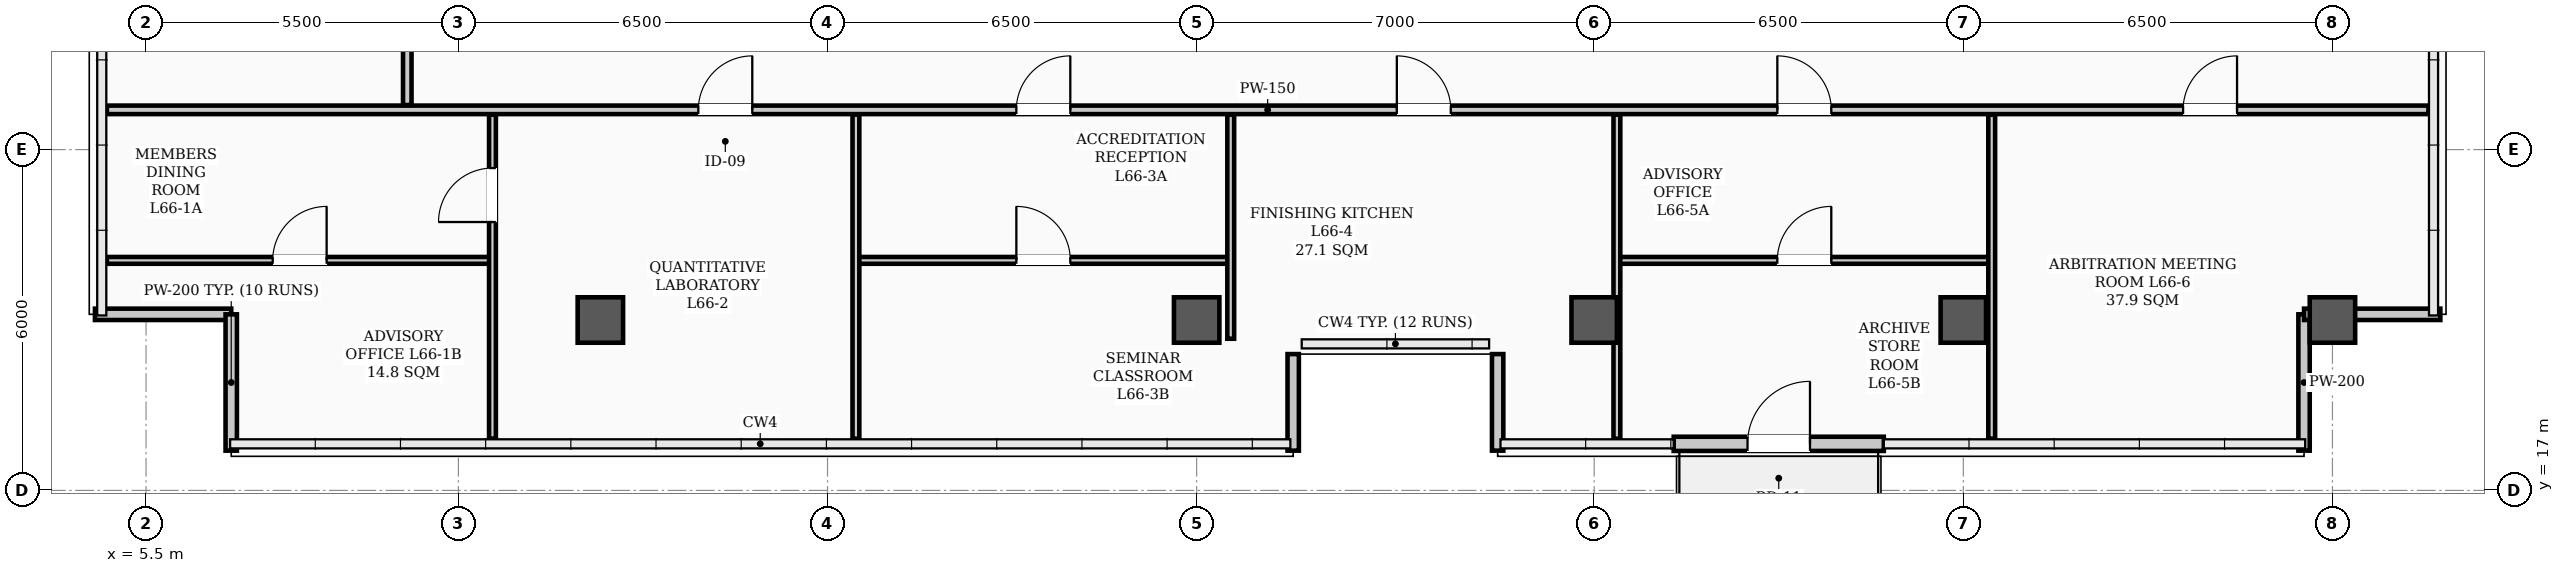
"""IFC4 building model, lengths in metres.
Left out: names, types, materials, properties, quantities, classifications, styles, units other than length and angle.
Written with IfcOpenShell. Run it as: python <this file> out.ifc"""

import sys

from ifc_helpers import new_model, si_unit, direction, frame, frame_2d, origin, origin_2d, place, context, subcontext, project, spatial, rectangle, hollow_rectangle, extrude, element, fill, save


model = new_model("IFC4")
c1 = context("Model", 3, precision=1e-05, world=origin(), true_north=direction((0.0, 1.0)))
c2 = subcontext(c1, "Body", "Model", "MODEL_VIEW")
j1 = project(units=[si_unit("LENGTHUNIT", "METRE"), si_unit("PLANEANGLEUNIT", "RADIAN")], contexts=[c1])
p1 = place(None, origin())
s1 = spatial("IfcSite", under=j1, at=p1, CompositionType="ELEMENT")
p2 = place(p1, origin())
s2 = spatial("IfcBuilding", under=s1, at=p2, CompositionType="ELEMENT")
p3 = place(p2, frame((0.0, 0.0, 265.7)))
s3 = spatial("IfcBuildingStorey", under=s2, at=p3, CompositionType="ELEMENT", Elevation=265.7)
for number, where, z_axis, x_axis in (
    (1, (13.5, 20.0, 0.0), (0.0, 0.0, 1.0), (1.0, 0.0, 0.0)),
    (2, (24.0, 20.0, 0.0), (0.0, 0.0, 1.0), (1.0, 0.0, 0.0)),
    (3, (31.0, 20.0, 0.0), (0.0, 0.0, 1.0), (1.0, 0.0, 0.0)),
    (4, (37.5, 20.0, 0.0), (0.0, 0.0, 1.0), (1.0, 0.0, 0.0)),
    (5, (44.0, 20.0, 0.0), (0.0, 0.0, 1.0), (1.0, 0.0, 0.0)),
):
    element("IfcColumn", number, at=place(p3, frame(where, z_axis=z_axis, x_axis=x_axis)), inside=s3, PredefinedType="COLUMN", context=c2, shape_type="SweptSolid", body=[
        extrude(hollow_rectangle(XDim=0.8, YDim=0.8, WallThickness=0.032, InnerFilletRadius=0.016, OuterFilletRadius=0.048, at=origin_2d()), origin(), (0.0, 0.0, 1.0), 3.9),
    ])
p4 = place(p3, frame((4.6, 20.1, 0.0), z_axis=(0.0, 0.0, 1.0), x_axis=(1.0, 0.0, 0.0)))
e6 = element("IfcWall", 6, at=p4, inside=s3, PredefinedType="PARAPET", context=c2, shape_type="SweptSolid", body=[
    extrude(rectangle(XDim=2.4, YDim=0.2, at=frame_2d((1.2, 0.0))), origin(), (0.0, 0.0, 1.0), 1.2),
])
for number, where, z_axis, x_axis in (
    (7, (7.0, 20.1, 0.0), (0.0, 0.0, 1.0), (0.0, -1.0, 0.0)),
    (8, (43.5, 17.7, 0.0), (0.0, 0.0, 1.0), (0.0, 1.0, 0.0)),
):
    element("IfcWall", number, at=place(p3, frame(where, z_axis=z_axis, x_axis=x_axis)), inside=s3, PredefinedType="PARAPET", context=c2, shape_type="SweptSolid", body=[
        extrude(rectangle(XDim=2.4, YDim=0.2, at=frame_2d((1.2, 0.0))), origin(), (0.0, 0.0, 1.0), 1.2),
    ])
p5 = place(p3, frame((43.5, 20.1, 0.0), z_axis=(0.0, 0.0, 1.0), x_axis=(1.0, 0.0, 0.0)))
e9 = element("IfcWall", 9, at=p5, inside=s3, PredefinedType="PARAPET", context=c2, shape_type="SweptSolid", body=[
    extrude(rectangle(XDim=2.4, YDim=0.2, at=frame_2d((1.2, 0.0))), origin(), (0.0, 0.0, 1.0), 1.2),
])
for number, where, z_axis, x_axis in (
    (10, (25.7, 17.7, 0.0), (0.0, 0.0, 1.0), (0.0, 1.0, 0.0)),
    (11, (29.3, 19.4, 0.0), (0.0, 0.0, 1.0), (0.0, -1.0, 0.0)),
):
    element("IfcWall", number, at=place(p3, frame(where, z_axis=z_axis, x_axis=x_axis)), inside=s3, PredefinedType="PARAPET", context=c2, shape_type="SweptSolid", body=[
        extrude(rectangle(XDim=1.7, YDim=0.2, at=frame_2d((0.85, 0.0))), origin(), (0.0, 0.0, 1.0), 1.2),
    ])
p6 = place(p3, frame((32.4, 17.82, 0.0), z_axis=(0.0, 0.0, 1.0), x_axis=(1.0, 0.0, 0.0)))
e12 = element("IfcWall", 12, at=p6, inside=s3, PredefinedType="STANDARD", context=c2, shape_type="SweptSolid", body=[
    extrude(rectangle(XDim=3.7, YDim=0.25, at=frame_2d((1.85, 0.0))), origin(), (0.0, 0.0, 1.0), 3.18),
])
p7 = place(p6, frame((1.3, 0.0, 0.0)))
e13 = element("IfcOpeningElement", 13, at=p7, cuts=e12, PredefinedType="OPENING", context=c2, shape_type="SweptSolid", body=[
    extrude(rectangle(XDim=1.1, YDim=2.2, at=frame_2d((0.55, 1.1))), frame((0.0, 0.135, 0.0), z_axis=(0.0, -1.0, 0.0), x_axis=(1.0, 0.0, 0.0)), (0.0, 0.0, 1.0), 0.27),
])
p8 = place(p3, frame((4.81, 23.7, 0.0), z_axis=(0.0, 0.0, 1.0), x_axis=(1.0, 0.0, 0.0)))
e14 = element("IfcWall", 14, at=p8, inside=s3, PredefinedType="PARTITIONING", context=c2, shape_type="SweptSolid", body=[
    extrude(rectangle(XDim=40.88, YDim=0.15, at=frame_2d((20.44, 0.0))), origin(), (0.0, 0.0, 1.0), 3.2),
])
p9 = place(p8, frame((10.415, 0.0, 0.0)))
e15 = element("IfcOpeningElement", 15, at=p9, cuts=e14, PredefinedType="OPENING", context=c2, shape_type="SweptSolid", body=[
    extrude(rectangle(XDim=0.95, YDim=2.08, at=frame_2d((0.475, 1.04))), frame((0.0, 0.085, 0.0), z_axis=(0.0, -1.0, 0.0), x_axis=(1.0, 0.0, 0.0)), (0.0, 0.0, 1.0), 0.17),
])
p10 = place(p8, frame((16.015, 0.0, 0.0)))
e16 = element("IfcOpeningElement", 16, at=p10, cuts=e14, PredefinedType="OPENING", context=c2, shape_type="SweptSolid", body=[
    extrude(rectangle(XDim=0.95, YDim=2.08, at=frame_2d((0.475, 1.04))), frame((0.0, 0.085, 0.0), z_axis=(0.0, -1.0, 0.0), x_axis=(1.0, 0.0, 0.0)), (0.0, 0.0, 1.0), 0.17),
])
p11 = place(p8, frame((22.715, 0.0, 0.0)))
e17 = element("IfcOpeningElement", 17, at=p11, cuts=e14, PredefinedType="OPENING", context=c2, shape_type="SweptSolid", body=[
    extrude(rectangle(XDim=0.95, YDim=2.08, at=frame_2d((0.475, 1.04))), frame((0.0, 0.085, 0.0), z_axis=(0.0, -1.0, 0.0), x_axis=(1.0, 0.0, 0.0)), (0.0, 0.0, 1.0), 0.17),
])
p12 = place(p8, frame((29.415, 0.0, 0.0)))
e18 = element("IfcOpeningElement", 18, at=p12, cuts=e14, PredefinedType="OPENING", context=c2, shape_type="SweptSolid", body=[
    extrude(rectangle(XDim=0.95, YDim=2.08, at=frame_2d((0.475, 1.04))), frame((0.0, 0.085, 0.0), z_axis=(0.0, -1.0, 0.0), x_axis=(1.0, 0.0, 0.0)), (0.0, 0.0, 1.0), 0.17),
])
p13 = place(p8, frame((36.56, 0.0, 0.0)))
e19 = element("IfcOpeningElement", 19, at=p13, cuts=e14, PredefinedType="OPENING", context=c2, shape_type="SweptSolid", body=[
    extrude(rectangle(XDim=0.95, YDim=2.08, at=frame_2d((0.475, 1.04))), frame((0.0, 0.085, 0.0), z_axis=(0.0, -1.0, 0.0), x_axis=(1.0, 0.0, 0.0)), (0.0, 0.0, 1.0), 0.17),
])
p14 = place(p3, frame((4.81, 21.05, 0.0), z_axis=(0.0, 0.0, 1.0), x_axis=(1.0, 0.0, 0.0)))
e20 = element("IfcWall", 20, at=p14, inside=s3, PredefinedType="PARTITIONING", context=c2, shape_type="SweptSolid", body=[
    extrude(rectangle(XDim=6.79, YDim=0.12, at=frame_2d((3.395, 0.0))), origin(), (0.0, 0.0, 1.0), 3.72),
])
p15 = place(p14, frame((2.92, 0.0, 0.0)))
e21 = element("IfcOpeningElement", 21, at=p15, cuts=e20, PredefinedType="OPENING", context=c2, shape_type="SweptSolid", body=[
    extrude(rectangle(XDim=0.95, YDim=2.08, at=frame_2d((0.475, 1.04))), frame((0.0, 0.07, 0.0), z_axis=(0.0, -1.0, 0.0), x_axis=(1.0, 0.0, 0.0)), (0.0, 0.0, 1.0), 0.14),
])
p16 = place(p3, frame((18.0, 21.05, 0.0), z_axis=(0.0, 0.0, 1.0), x_axis=(1.0, 0.0, 0.0)))
e22 = element("IfcWall", 22, at=p16, inside=s3, PredefinedType="PARTITIONING", context=c2, shape_type="SweptSolid", body=[
    extrude(rectangle(XDim=6.6, YDim=0.12, at=frame_2d((3.3, 0.0))), origin(), (0.0, 0.0, 1.0), 3.2),
])
p17 = place(p16, frame((2.825, 0.0, 0.0)))
e23 = element("IfcOpeningElement", 23, at=p17, cuts=e22, PredefinedType="OPENING", context=c2, shape_type="SweptSolid", body=[
    extrude(rectangle(XDim=0.95, YDim=2.08, at=frame_2d((0.475, 1.04))), frame((0.0, 0.07, 0.0), z_axis=(0.0, -1.0, 0.0), x_axis=(1.0, 0.0, 0.0)), (0.0, 0.0, 1.0), 0.14),
])
p18 = place(p3, frame((31.4, 21.05, 0.0), z_axis=(0.0, 0.0, 1.0), x_axis=(1.0, 0.0, 0.0)))
e24 = element("IfcWall", 24, at=p18, inside=s3, PredefinedType="PARTITIONING", context=c2, shape_type="SweptSolid", body=[
    extrude(rectangle(XDim=6.6, YDim=0.12, at=frame_2d((3.3, 0.0))), origin(), (0.0, 0.0, 1.0), 3.2),
])
p19 = place(p18, frame((2.825, 0.0, 0.0)))
e25 = element("IfcOpeningElement", 25, at=p19, cuts=e24, PredefinedType="OPENING", context=c2, shape_type="SweptSolid", body=[
    extrude(rectangle(XDim=0.95, YDim=2.08, at=frame_2d((0.475, 1.04))), frame((0.0, 0.07, 0.0), z_axis=(0.0, -1.0, 0.0), x_axis=(1.0, 0.0, 0.0)), (0.0, 0.0, 1.0), 0.14),
])
p20 = place(p3, frame((10.1, 23.785, 0.0), z_axis=(0.0, 0.0, 1.0), x_axis=(0.0, 1.0, 0.0)))
e26 = element("IfcWall", 26, at=p20, inside=s3, PredefinedType="PARTITIONING", context=c2, shape_type="SweptSolid", body=[
    extrude(rectangle(XDim=17.88, YDim=0.15, at=frame_2d((8.94, 0.0))), origin(), (0.0, 0.0, 1.0), 3.1),
])
p21 = place(p20, frame((8.465, 0.0, 0.0)))
e27 = element("IfcOpeningElement", 27, at=p21, cuts=e26, PredefinedType="OPENING", context=c2, shape_type="SweptSolid", body=[
    extrude(rectangle(XDim=0.95, YDim=2.08, at=frame_2d((0.475, 1.04))), frame((0.0, 0.085, 0.0), z_axis=(0.0, -1.0, 0.0), x_axis=(1.0, 0.0, 0.0)), (0.0, 0.0, 1.0), 0.17),
])
p22 = place(p3, frame((11.6, 17.91, 0.0), z_axis=(0.0, 0.0, 1.0), x_axis=(0.0, 1.0, 0.0)))
e28 = element("IfcWall", 28, at=p22, inside=s3, PredefinedType="PARTITIONING", context=c2, shape_type="SweptSolid", body=[
    extrude(rectangle(XDim=5.705, YDim=0.12, at=frame_2d((2.853, 0.0))), origin(), (0.0, 0.0, 1.0), 3.72),
])
p23 = place(p22, frame((3.815, 0.0, 0.0)))
e29 = element("IfcOpeningElement", 29, at=p23, cuts=e28, PredefinedType="OPENING", context=c2, shape_type="SweptSolid", body=[
    extrude(rectangle(XDim=0.95, YDim=2.08, at=frame_2d((0.475, 1.04))), frame((0.0, 0.07, 0.0), z_axis=(0.0, -1.0, 0.0), x_axis=(1.0, 0.0, 0.0)), (0.0, 0.0, 1.0), 0.14),
])
p24 = place(p3, frame((18.0, 17.91, 0.0), z_axis=(0.0, 0.0, 1.0), x_axis=(0.0, 1.0, 0.0)))
e30 = element("IfcWall", 30, at=p24, inside=s3, PredefinedType="PARTITIONING", context=c2, shape_type="SweptSolid", body=[
    extrude(rectangle(XDim=5.705, YDim=0.12, at=frame_2d((2.853, 0.0))), origin(), (0.0, 0.0, 1.0), 3.1),
])
p25 = place(p3, frame((24.6, 19.67, 0.0), z_axis=(0.0, 0.0, 1.0), x_axis=(0.0, 1.0, 0.0)))
e31 = element("IfcWall", 31, at=p25, inside=s3, PredefinedType="PARTITIONING", context=c2, shape_type="SweptSolid", body=[
    extrude(rectangle(XDim=3.945, YDim=0.12, at=frame_2d((1.973, 0.0))), origin(), (0.0, 0.0, 1.0), 3.1),
])
for number, where, z_axis, x_axis in (
    (32, (31.4, 17.91, 0.0), (0.0, 0.0, 1.0), (0.0, 1.0, 0.0)),
    (33, (38.0, 17.91, 0.0), (0.0, 0.0, 1.0), (0.0, 1.0, 0.0)),
):
    element("IfcWall", number, at=place(p3, frame(where, z_axis=z_axis, x_axis=x_axis)), inside=s3, PredefinedType="PARTITIONING", context=c2, shape_type="SweptSolid", body=[
        extrude(rectangle(XDim=5.705, YDim=0.12, at=frame_2d((2.853, 0.0))), origin(), (0.0, 0.0, 1.0), 3.1),
    ])
p26 = place(p7, origin())
e34 = element("IfcDoor", 34, at=p26, inside=s3, OperationType="SINGLE_SWING_RIGHT", PredefinedType="DOOR", context=c2, shape_type="SweptSolid", body=[
    extrude(rectangle(XDim=1.1, YDim=2.2, at=frame_2d((0.55, 1.1))), frame((0.0, 0.025, 0.0), z_axis=(0.0, -1.0, 0.0), x_axis=(1.0, 0.0, 0.0)), (0.0, 0.0, 1.0), 0.05),
])
fill(e13, e34)
p27 = place(p15, origin())
e35 = element("IfcDoor", 35, at=p27, inside=s3, OperationType="SINGLE_SWING_RIGHT", PredefinedType="DOOR", context=c2, shape_type="SweptSolid", body=[
    extrude(rectangle(XDim=0.95, YDim=2.08, at=frame_2d((0.475, 1.04))), frame((0.0, 0.025, 0.0), z_axis=(0.0, -1.0, 0.0), x_axis=(1.0, 0.0, 0.0)), (0.0, 0.0, 1.0), 0.05),
])
fill(e21, e35)
p28 = place(p23, origin())
e36 = element("IfcDoor", 36, at=p28, inside=s3, OperationType="SINGLE_SWING_LEFT", PredefinedType="DOOR", context=c2, shape_type="SweptSolid", body=[
    extrude(rectangle(XDim=0.95, YDim=2.08, at=frame_2d((0.475, 1.04))), frame((0.0, 0.025, 0.0), z_axis=(0.0, -1.0, 0.0), x_axis=(1.0, 0.0, 0.0)), (0.0, 0.0, 1.0), 0.05),
])
fill(e29, e36)
p29 = place(p9, origin())
e37 = element("IfcDoor", 37, at=p29, inside=s3, OperationType="SINGLE_SWING_RIGHT", PredefinedType="DOOR", context=c2, shape_type="SweptSolid", body=[
    extrude(rectangle(XDim=0.95, YDim=2.08, at=frame_2d((0.475, 1.04))), frame((0.0, 0.025, 0.0), z_axis=(0.0, -1.0, 0.0), x_axis=(1.0, 0.0, 0.0)), (0.0, 0.0, 1.0), 0.05),
])
fill(e15, e37)
p30 = place(p17, origin())
e38 = element("IfcDoor", 38, at=p30, inside=s3, OperationType="SINGLE_SWING_LEFT", PredefinedType="DOOR", context=c2, shape_type="SweptSolid", body=[
    extrude(rectangle(XDim=0.95, YDim=2.08, at=frame_2d((0.475, 1.04))), frame((0.0, 0.025, 0.0), z_axis=(0.0, -1.0, 0.0), x_axis=(1.0, 0.0, 0.0)), (0.0, 0.0, 1.0), 0.05),
])
fill(e23, e38)
p31 = place(p10, origin())
e39 = element("IfcDoor", 39, at=p31, inside=s3, OperationType="SINGLE_SWING_RIGHT", PredefinedType="DOOR", context=c2, shape_type="SweptSolid", body=[
    extrude(rectangle(XDim=0.95, YDim=2.08, at=frame_2d((0.475, 1.04))), frame((0.0, 0.025, 0.0), z_axis=(0.0, -1.0, 0.0), x_axis=(1.0, 0.0, 0.0)), (0.0, 0.0, 1.0), 0.05),
])
fill(e16, e39)
p32 = place(p11, origin())
e40 = element("IfcDoor", 40, at=p32, inside=s3, OperationType="SINGLE_SWING_LEFT", PredefinedType="DOOR", context=c2, shape_type="SweptSolid", body=[
    extrude(rectangle(XDim=0.95, YDim=2.08, at=frame_2d((0.475, 1.04))), frame((0.0, 0.025, 0.0), z_axis=(0.0, -1.0, 0.0), x_axis=(1.0, 0.0, 0.0)), (0.0, 0.0, 1.0), 0.05),
])
fill(e17, e40)
p33 = place(p19, origin())
e41 = element("IfcDoor", 41, at=p33, inside=s3, OperationType="SINGLE_SWING_RIGHT", PredefinedType="DOOR", context=c2, shape_type="SweptSolid", body=[
    extrude(rectangle(XDim=0.95, YDim=2.08, at=frame_2d((0.475, 1.04))), frame((0.0, 0.025, 0.0), z_axis=(0.0, -1.0, 0.0), x_axis=(1.0, 0.0, 0.0)), (0.0, 0.0, 1.0), 0.05),
])
fill(e25, e41)
p34 = place(p12, origin())
e42 = element("IfcDoor", 42, at=p34, inside=s3, OperationType="SINGLE_SWING_LEFT", PredefinedType="DOOR", context=c2, shape_type="SweptSolid", body=[
    extrude(rectangle(XDim=0.95, YDim=2.08, at=frame_2d((0.475, 1.04))), frame((0.0, 0.025, 0.0), z_axis=(0.0, -1.0, 0.0), x_axis=(1.0, 0.0, 0.0)), (0.0, 0.0, 1.0), 0.05),
])
fill(e18, e42)
p35 = place(p13, origin())
e43 = element("IfcDoor", 43, at=p35, inside=s3, OperationType="SINGLE_SWING_RIGHT", PredefinedType="DOOR", context=c2, shape_type="SweptSolid", body=[
    extrude(rectangle(XDim=0.95, YDim=2.08, at=frame_2d((0.475, 1.04))), frame((0.0, 0.025, 0.0), z_axis=(0.0, -1.0, 0.0), x_axis=(1.0, 0.0, 0.0)), (0.0, 0.0, 1.0), 0.05),
])
fill(e19, e43)
save(model, sys.argv[1])
